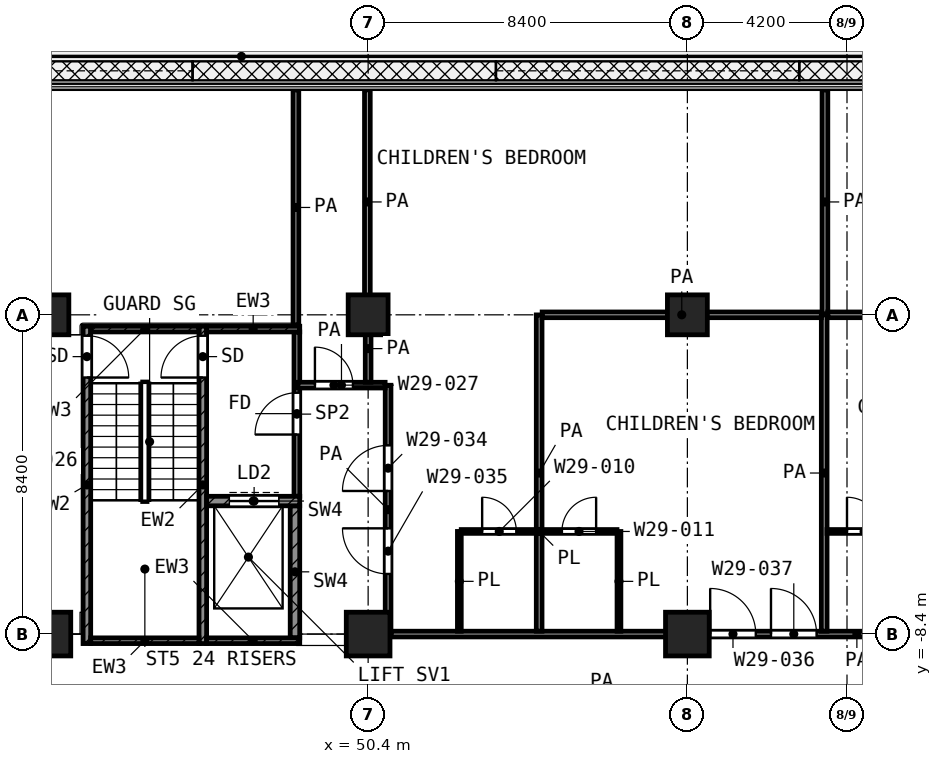
"""IFC4 building model, lengths in metres.
Left out: names, types, materials, properties, quantities, classifications, styles, units other than length and angle.
Written with IfcOpenShell. Run it as: python <this file> out.ifc"""

import sys

from ifc_helpers import new_model, si_unit, direction, frame, frame_2d, origin, origin_2d, place, context, subcontext, project, spatial, rectangle, extrude, element, fill, save


model = new_model("IFC4")
c1 = context("Model", 3, precision=1e-05, world=origin(), true_north=direction((0.0, 1.0)))
c2 = subcontext(c1, "Body", "Model", "MODEL_VIEW")
j1 = project(units=[si_unit("LENGTHUNIT", "METRE"), si_unit("PLANEANGLEUNIT", "RADIAN")], contexts=[c1])
p1 = place(None, origin())
s1 = spatial("IfcSite", under=j1, at=p1, CompositionType="ELEMENT")
p2 = place(p1, origin())
s2 = spatial("IfcBuilding", under=s1, at=p2, CompositionType="ELEMENT")
p3 = place(p2, frame((0.0, 0.0, 128.2)))
s3 = spatial("IfcBuildingStorey", under=s2, at=p3, CompositionType="ELEMENT", Elevation=128.2)
for number, where, z_axis, x_axis in (
    (1, (42.0, 0.0, 0.0), (0.0, 0.0, 1.0), (1.0, 0.0, 0.0)),
    (2, (50.4, 0.0, 0.0), (0.0, 0.0, 1.0), (1.0, 0.0, 0.0)),
    (3, (58.8, 0.0, 0.0), (0.0, 0.0, 1.0), (1.0, 0.0, 0.0)),
):
    element("IfcColumn", number, at=place(p3, frame(where, z_axis=z_axis, x_axis=x_axis)), inside=s3, PredefinedType="COLUMN", context=c2, shape_type="SweptSolid", body=[
        extrude(rectangle(XDim=1.05, YDim=1.05, at=origin_2d()), origin(), (0.0, 0.0, 1.0), 4.2),
    ])
for number, where, z_axis, x_axis in (
    (4, (42.0, -8.4, 0.0), (0.0, 0.0, 1.0), (1.0, 0.0, 0.0)),
    (5, (50.4, -8.4, 0.0), (0.0, 0.0, 1.0), (1.0, 0.0, 0.0)),
    (6, (58.8, -8.4, 0.0), (0.0, 0.0, 1.0), (1.0, 0.0, 0.0)),
):
    element("IfcColumn", number, at=place(p3, frame(where, z_axis=z_axis, x_axis=x_axis)), inside=s3, PredefinedType="COLUMN", context=c2, shape_type="SweptSolid", body=[
        extrude(rectangle(XDim=1.15, YDim=1.15, at=origin_2d()), origin(), (0.0, 0.0, 1.0), 4.2),
    ])
p4 = place(p3, frame((43.0, -8.65, 0.0), z_axis=(0.0, 0.0, 1.0), x_axis=(0.0, 1.0, 0.0)))
e7 = element("IfcWall", 7, at=p4, inside=s3, PredefinedType="SHEAR", context=c2, shape_type="SweptSolid", body=[
    extrude(rectangle(XDim=8.35, YDim=0.2, at=frame_2d((4.175, 0.0))), origin(), (0.0, 0.0, 1.0), 3.6),
])
p5 = place(p4, frame((7.0, 0.0, 0.0)))
e8 = element("IfcOpeningElement", 8, at=p5, cuts=e7, PredefinedType="OPENING", context=c2, shape_type="SweptSolid", body=[
    extrude(rectangle(XDim=1.1, YDim=2.1, at=frame_2d((0.55, 1.05))), frame((0.0, 0.11, 0.0), z_axis=(0.0, -1.0, 0.0), x_axis=(1.0, 0.0, 0.0)), (0.0, 0.0, 1.0), 0.22),
])
p6 = place(p3, frame((46.05, -8.65, 0.0), z_axis=(0.0, 0.0, 1.0), x_axis=(0.0, 1.0, 0.0)))
e9 = element("IfcWall", 9, at=p6, inside=s3, PredefinedType="SHEAR", context=c2, shape_type="SweptSolid", body=[
    extrude(rectangle(XDim=8.35, YDim=0.2, at=frame_2d((4.175, 0.0))), origin(), (0.0, 0.0, 1.0), 3.6),
])
p7 = place(p6, frame((7.0, 0.0, 0.0)))
e10 = element("IfcOpeningElement", 10, at=p7, cuts=e9, PredefinedType="OPENING", context=c2, shape_type="SweptSolid", body=[
    extrude(rectangle(XDim=1.1, YDim=2.1, at=frame_2d((0.55, 1.05))), frame((0.0, 0.11, 0.0), z_axis=(0.0, -1.0, 0.0), x_axis=(1.0, 0.0, 0.0)), (0.0, 0.0, 1.0), 0.22),
])
p8 = place(p3, frame((43.1, -0.375, 0.0), z_axis=(0.0, 0.0, 1.0), x_axis=(1.0, 0.0, 0.0)))
e11 = element("IfcWall", 11, at=p8, inside=s3, PredefinedType="SHEAR", context=c2, shape_type="SweptSolid", body=[
    extrude(rectangle(XDim=2.85, YDim=0.15, at=frame_2d((1.425, 0.0))), origin(), (0.0, 0.0, 1.0), 3.6),
])
p9 = place(p3, frame((46.15, -0.375, 0.0), z_axis=(0.0, 0.0, 1.0), x_axis=(1.0, 0.0, 0.0)))
e12 = element("IfcWall", 12, at=p9, inside=s3, PredefinedType="SHEAR", context=c2, shape_type="SweptSolid", body=[
    extrude(rectangle(XDim=2.45, YDim=0.15, at=frame_2d((1.225, 0.0))), origin(), (0.0, 0.0, 1.0), 3.6),
])
p10 = place(p3, frame((43.1, -8.575, 0.0), z_axis=(0.0, 0.0, 1.0), x_axis=(1.0, 0.0, 0.0)))
e13 = element("IfcWall", 13, at=p10, inside=s3, PredefinedType="SHEAR", context=c2, shape_type="SweptSolid", body=[
    extrude(rectangle(XDim=2.85, YDim=0.15, at=frame_2d((1.425, 0.0))), origin(), (0.0, 0.0, 1.0), 3.6),
])
p11 = place(p3, frame((46.15, -8.575, 0.0), z_axis=(0.0, 0.0, 1.0), x_axis=(1.0, 0.0, 0.0)))
e14 = element("IfcWall", 14, at=p11, inside=s3, PredefinedType="SHEAR", context=c2, shape_type="SweptSolid", body=[
    extrude(rectangle(XDim=2.45, YDim=0.15, at=frame_2d((1.225, 0.0))), origin(), (0.0, 0.0, 1.0), 3.6),
])
p12 = place(p3, frame((46.15, -4.9, 0.0), z_axis=(0.0, 0.0, 1.0), x_axis=(1.0, 0.0, 0.0)))
e15 = element("IfcWall", 15, at=p12, inside=s3, PredefinedType="SHEAR", context=c2, shape_type="SweptSolid", body=[
    extrude(rectangle(XDim=2.45, YDim=0.25, at=frame_2d((1.225, 0.0))), origin(), (0.0, 0.0, 1.0), 3.6),
])
p13 = place(p12, frame((0.6, 0.0, 0.0)))
e16 = element("IfcOpeningElement", 16, at=p13, cuts=e15, PredefinedType="OPENING", context=c2, shape_type="SweptSolid", body=[
    extrude(rectangle(XDim=1.3, YDim=2.1, at=frame_2d((0.65, 1.05))), frame((0.0, 0.135, 0.0), z_axis=(0.0, -1.0, 0.0), x_axis=(1.0, 0.0, 0.0)), (0.0, 0.0, 1.0), 0.27),
])
p14 = place(p3, frame((48.475, -8.5, 0.0), z_axis=(0.0, 0.0, 1.0), x_axis=(0.0, 1.0, 0.0)))
e17 = element("IfcWall", 17, at=p14, inside=s3, PredefinedType="SHEAR", context=c2, shape_type="SweptSolid", body=[
    extrude(rectangle(XDim=3.475, YDim=0.25, at=frame_2d((1.738, 0.0))), origin(), (0.0, 0.0, 1.0), 3.6),
])
p15 = place(p3, frame((48.525, -4.775, 0.0), z_axis=(0.0, 0.0, 1.0), x_axis=(0.0, 1.0, 0.0)))
e18 = element("IfcWall", 18, at=p15, inside=s3, PredefinedType="PARTITIONING", context=c2, shape_type="SweptSolid", body=[
    extrude(rectangle(XDim=4.325, YDim=0.15, at=frame_2d((2.163, 0.0))), origin(), (0.0, 0.0, 1.0), 3.6),
])
p16 = place(p15, frame((1.625, 0.0, 0.0)))
e19 = element("IfcOpeningElement", 19, at=p16, cuts=e18, PredefinedType="OPENING", context=c2, shape_type="SweptSolid", body=[
    extrude(rectangle(XDim=1.1, YDim=2.1, at=frame_2d((0.55, 1.05))), frame((0.0, 0.085, 0.0), z_axis=(0.0, -1.0, 0.0), x_axis=(1.0, 0.0, 0.0)), (0.0, 0.0, 1.0), 0.17),
])
p17 = place(p3, frame((52.85, -5.7, 0.0), z_axis=(0.0, 0.0, 1.0), x_axis=(1.0, 0.0, 0.0)))
e20 = element("IfcWall", 20, at=p17, inside=s3, PredefinedType="PARTITIONING", context=c2, shape_type="SweptSolid", body=[
    extrude(rectangle(XDim=4.098, YDim=0.1, at=frame_2d((2.049, 0.0))), origin(), (0.0, 0.0, 1.0), 3.6),
])
p18 = place(p17, frame((0.55, 0.0, 0.0)))
e21 = element("IfcOpeningElement", 21, at=p18, cuts=e20, PredefinedType="OPENING", context=c2, shape_type="SweptSolid", body=[
    extrude(rectangle(XDim=0.9, YDim=2.1, at=frame_2d((0.45, 1.05))), frame((0.0, 0.06, 0.0), z_axis=(0.0, -1.0, 0.0), x_axis=(1.0, 0.0, 0.0)), (0.0, 0.0, 1.0), 0.12),
])
p19 = place(p17, frame((2.649, 0.0, 0.0)))
e22 = element("IfcOpeningElement", 22, at=p19, cuts=e20, PredefinedType="OPENING", context=c2, shape_type="SweptSolid", body=[
    extrude(rectangle(XDim=0.9, YDim=2.1, at=frame_2d((0.45, 1.05))), frame((0.0, 0.06, 0.0), z_axis=(0.0, -1.0, 0.0), x_axis=(1.0, 0.0, 0.0)), (0.0, 0.0, 1.0), 0.12),
])
p20 = place(p3, frame((62.475, -5.7, 0.0), z_axis=(0.0, 0.0, 1.0), x_axis=(1.0, 0.0, 0.0)))
e23 = element("IfcWall", 23, at=p20, inside=s3, PredefinedType="PARTITIONING", context=c2, shape_type="SweptSolid", body=[
    extrude(rectangle(XDim=1.975, YDim=0.1, at=frame_2d((0.987, 0.0))), origin(), (0.0, 0.0, 1.0), 3.6),
])
p21 = place(p20, frame((0.525, 0.0, 0.0)))
e24 = element("IfcOpeningElement", 24, at=p21, cuts=e23, PredefinedType="OPENING", context=c2, shape_type="SweptSolid", body=[
    extrude(rectangle(XDim=0.9, YDim=2.1, at=frame_2d((0.45, 1.05))), frame((0.0, 0.06, 0.0), z_axis=(0.0, -1.0, 0.0), x_axis=(1.0, 0.0, 0.0)), (0.0, 0.0, 1.0), 0.12),
])
p22 = place(p3, frame((52.8, -8.325, 0.0), z_axis=(0.0, 0.0, 1.0), x_axis=(0.0, 1.0, 0.0)))
e25 = element("IfcWall", 25, at=p22, inside=s3, PredefinedType="PARTITIONING", context=c2, shape_type="SweptSolid", body=[
    extrude(rectangle(XDim=2.625, YDim=0.1, at=frame_2d((1.312, 0.0))), origin(), (0.0, 0.0, 1.0), 3.6),
])
p23 = place(p3, frame((57.0, -8.325, 0.0), z_axis=(0.0, 0.0, 1.0), x_axis=(0.0, 1.0, 0.0)))
e26 = element("IfcWall", 26, at=p23, inside=s3, PredefinedType="PARTITIONING", context=c2, shape_type="SweptSolid", body=[
    extrude(rectangle(XDim=2.624, YDim=0.1, at=frame_2d((1.312, 0.0))), origin(), (0.0, 0.0, 1.0), 3.6),
])
p24 = place(p3, frame((51.0, -8.4, 0.0), z_axis=(0.0, 0.0, 1.0), x_axis=(1.0, 0.0, 0.0)))
e27 = element("IfcWall", 27, at=p24, inside=s3, PredefinedType="PARTITIONING", context=c2, shape_type="SweptSolid", body=[
    extrude(rectangle(XDim=24.52, YDim=0.15, at=frame_2d((12.26, 0.0))), origin(), (0.0, 0.0, 1.0), 3.6),
])
p25 = place(p24, frame((8.4, 0.0, 0.0)))
e28 = element("IfcOpeningElement", 28, at=p25, cuts=e27, PredefinedType="OPENING", context=c2, shape_type="SweptSolid", body=[
    extrude(rectangle(XDim=1.2, YDim=2.1, at=frame_2d((0.6, 1.05))), frame((0.0, 0.085, 0.0), z_axis=(0.0, -1.0, 0.0), x_axis=(1.0, 0.0, 0.0)), (0.0, 0.0, 1.0), 0.17),
])
p26 = place(p24, frame((10.0, 0.0, 0.0)))
e29 = element("IfcOpeningElement", 29, at=p26, cuts=e27, PredefinedType="OPENING", context=c2, shape_type="SweptSolid", body=[
    extrude(rectangle(XDim=1.2, YDim=2.1, at=frame_2d((0.6, 1.05))), frame((0.0, 0.085, 0.0), z_axis=(0.0, -1.0, 0.0), x_axis=(1.0, 0.0, 0.0)), (0.0, 0.0, 1.0), 0.17),
])
p27 = place(p24, frame((13.8, 0.0, 0.0)))
e30 = element("IfcOpeningElement", 30, at=p27, cuts=e27, PredefinedType="OPENING", context=c2, shape_type="SweptSolid", body=[
    extrude(rectangle(XDim=1.2, YDim=2.1, at=frame_2d((0.6, 1.05))), frame((0.0, 0.085, 0.0), z_axis=(0.0, -1.0, 0.0), x_axis=(1.0, 0.0, 0.0)), (0.0, 0.0, 1.0), 0.17),
])
p28 = place(p24, frame((16.8, 0.0, 0.0)))
e31 = element("IfcOpeningElement", 31, at=p28, cuts=e27, PredefinedType="OPENING", context=c2, shape_type="SweptSolid", body=[
    extrude(rectangle(XDim=1.2, YDim=2.1, at=frame_2d((0.6, 1.05))), frame((0.0, 0.085, 0.0), z_axis=(0.0, -1.0, 0.0), x_axis=(1.0, 0.0, 0.0)), (0.0, 0.0, 1.0), 0.17),
])
p29 = place(p24, frame((22.0, 0.0, 0.0)))
e32 = element("IfcOpeningElement", 32, at=p29, cuts=e27, PredefinedType="OPENING", context=c2, shape_type="SweptSolid", body=[
    extrude(rectangle(XDim=1.0, YDim=2.1, at=frame_2d((0.5, 1.05))), frame((0.0, 0.085, 0.0), z_axis=(0.0, -1.0, 0.0), x_axis=(1.0, 0.0, 0.0)), (0.0, 0.0, 1.0), 0.17),
])
p30 = place(p3, frame((48.55, -1.85, 0.0), z_axis=(0.0, 0.0, 1.0), x_axis=(1.0, 0.0, 0.0)))
e33 = element("IfcWall", 33, at=p30, inside=s3, PredefinedType="PARTITIONING", context=c2, shape_type="SweptSolid", body=[
    extrude(rectangle(XDim=2.297, YDim=0.15, at=frame_2d((1.148, 0.0))), origin(), (0.0, 0.0, 1.0), 3.6),
])
p31 = place(p30, frame((0.45, 0.0, 0.0)))
e34 = element("IfcOpeningElement", 34, at=p31, cuts=e33, PredefinedType="OPENING", context=c2, shape_type="SweptSolid", body=[
    extrude(rectangle(XDim=1.0, YDim=2.1, at=frame_2d((0.5, 1.05))), frame((0.0, 0.085, 0.0), z_axis=(0.0, -1.0, 0.0), x_axis=(1.0, 0.0, 0.0)), (0.0, 0.0, 1.0), 0.17),
])
p32 = place(p3, frame((54.979, 0.0, 0.0), z_axis=(0.0, 0.0, 1.0), x_axis=(1.0, 0.0, 0.0)))
e35 = element("IfcWall", 35, at=p32, inside=s3, PredefinedType="PARTITIONING", context=c2, shape_type="SweptSolid", body=[
    extrude(rectangle(XDim=7.346, YDim=0.15, at=frame_2d((3.673, 0.0))), origin(), (0.0, 0.0, 1.0), 3.6),
])
p33 = place(p3, frame((62.495, 0.0, 0.0), z_axis=(0.0, 0.0, 1.0), x_axis=(1.0, 0.0, 0.0)))
e36 = element("IfcWall", 36, at=p33, inside=s3, PredefinedType="PARTITIONING", context=c2, shape_type="SweptSolid", body=[
    extrude(rectangle(XDim=4.61, YDim=0.15, at=frame_2d((2.305, 0.0))), origin(), (0.0, 0.0, 1.0), 3.6),
])
p34 = place(p3, frame((48.5, -0.27, 0.0), z_axis=(0.0, 0.0, 1.0), x_axis=(0.0, 1.0, 0.0)))
e37 = element("IfcWall", 37, at=p34, inside=s3, PredefinedType="PARTITIONING", context=c2, shape_type="SweptSolid", body=[
    extrude(rectangle(XDim=6.19, YDim=0.15, at=frame_2d((3.095, 0.0))), origin(), (0.0, 0.0, 1.0), 3.6),
])
p35 = place(p3, frame((50.38, 0.02, 0.0), z_axis=(0.0, 0.0, 1.0), x_axis=(0.0, 1.0, 0.0)))
e38 = element("IfcWall", 38, at=p35, inside=s3, PredefinedType="PARTITIONING", context=c2, shape_type="SweptSolid", body=[
    extrude(rectangle(XDim=5.9, YDim=0.15, at=frame_2d((2.95, 0.0))), origin(), (0.0, 0.0, 1.0), 3.6),
])
p36 = place(p3, frame((50.4, -1.775, 0.0), z_axis=(0.0, 0.0, 1.0), x_axis=(0.0, 1.0, 0.0)))
e39 = element("IfcWall", 39, at=p36, inside=s3, PredefinedType="PARTITIONING", context=c2, shape_type="SweptSolid", body=[
    extrude(rectangle(XDim=1.772, YDim=0.15, at=frame_2d((0.886, 0.0))), origin(), (0.0, 0.0, 1.0), 3.6),
])
p37 = place(p3, frame((50.925, -8.4, 0.0), z_axis=(0.0, 0.0, 1.0), x_axis=(0.0, 1.0, 0.0)))
e40 = element("IfcWall", 40, at=p37, inside=s3, PredefinedType="PARTITIONING", context=c2, shape_type="SweptSolid", body=[
    extrude(rectangle(XDim=6.547, YDim=0.15, at=frame_2d((3.273, 0.0))), origin(), (0.0, 0.0, 1.0), 3.6),
])
p38 = place(p37, frame((3.765, 0.0, 0.0)))
e41 = element("IfcOpeningElement", 41, at=p38, cuts=e40, PredefinedType="OPENING", context=c2, shape_type="SweptSolid", body=[
    extrude(rectangle(XDim=1.2, YDim=2.1, at=frame_2d((0.6, 1.05))), frame((0.0, 0.085, 0.0), z_axis=(0.0, -1.0, 0.0), x_axis=(1.0, 0.0, 0.0)), (0.0, 0.0, 1.0), 0.17),
])
p39 = place(p37, frame((1.582, 0.0, 0.0)))
e42 = element("IfcOpeningElement", 42, at=p39, cuts=e40, PredefinedType="OPENING", context=c2, shape_type="SweptSolid", body=[
    extrude(rectangle(XDim=1.2, YDim=2.1, at=frame_2d((0.6, 1.05))), frame((0.0, 0.085, 0.0), z_axis=(0.0, -1.0, 0.0), x_axis=(1.0, 0.0, 0.0)), (0.0, 0.0, 1.0), 0.17),
])
p40 = place(p3, frame((54.9, -8.325, 0.0), z_axis=(0.0, 0.0, 1.0), x_axis=(0.0, 1.0, 0.0)))
e43 = element("IfcWall", 43, at=p40, inside=s3, PredefinedType="PARTITIONING", context=c2, shape_type="SweptSolid", body=[
    extrude(rectangle(XDim=8.323, YDim=0.15, at=frame_2d((4.162, 0.0))), origin(), (0.0, 0.0, 1.0), 3.6),
])
p41 = place(p3, frame((62.4, -8.325, 0.0), z_axis=(0.0, 0.0, 1.0), x_axis=(0.0, 1.0, 0.0)))
e44 = element("IfcWall", 44, at=p41, inside=s3, PredefinedType="PARTITIONING", context=c2, shape_type="SweptSolid", body=[
    extrude(rectangle(XDim=8.325, YDim=0.15, at=frame_2d((4.163, 0.0))), origin(), (0.0, 0.0, 1.0), 3.6),
])
p42 = place(p3, frame((62.42, 0.02, 0.0), z_axis=(0.0, 0.0, 1.0), x_axis=(0.0, 1.0, 0.0)))
e45 = element("IfcWall", 45, at=p42, inside=s3, PredefinedType="PARTITIONING", context=c2, shape_type="SweptSolid", body=[
    extrude(rectangle(XDim=5.9, YDim=0.15, at=frame_2d((2.95, 0.0))), origin(), (0.0, 0.0, 1.0), 3.6),
])
p43 = place(p5, frame((1.1, 0.0, 0.0), z_axis=(0.0, 0.0, 1.0), x_axis=(-1.0, 0.0, 0.0)))
e46 = element("IfcDoor", 46, at=p43, inside=s3, OperationType="SINGLE_SWING_LEFT", PredefinedType="DOOR", context=c2, shape_type="SweptSolid", body=[
    extrude(rectangle(XDim=1.1, YDim=2.1, at=frame_2d((0.55, 1.05))), frame((0.0, 0.025, 0.0), z_axis=(0.0, -1.0, 0.0), x_axis=(1.0, 0.0, 0.0)), (0.0, 0.0, 1.0), 0.05),
])
fill(e8, e46)
p44 = place(p7, origin())
e47 = element("IfcDoor", 47, at=p44, inside=s3, OperationType="SINGLE_SWING_LEFT", PredefinedType="DOOR", context=c2, shape_type="SweptSolid", body=[
    extrude(rectangle(XDim=1.1, YDim=2.1, at=frame_2d((0.55, 1.05))), frame((0.0, 0.025, 0.0), z_axis=(0.0, -1.0, 0.0), x_axis=(1.0, 0.0, 0.0)), (0.0, 0.0, 1.0), 0.05),
])
fill(e10, e47)
p45 = place(p13, origin())
e48 = element("IfcDoor", 48, at=p45, inside=s3, OperationType="DOUBLE_DOOR_SLIDING", PredefinedType="DOOR", context=c2, shape_type="SweptSolid", body=[
    extrude(rectangle(XDim=1.3, YDim=2.1, at=frame_2d((0.65, 1.05))), frame((0.0, 0.025, 0.0), z_axis=(0.0, -1.0, 0.0), x_axis=(1.0, 0.0, 0.0)), (0.0, 0.0, 1.0), 0.05),
])
fill(e16, e48)
p46 = place(p16, origin())
e49 = element("IfcDoor", 49, at=p46, inside=s3, OperationType="SINGLE_SWING_LEFT", PredefinedType="DOOR", context=c2, shape_type="SweptSolid", body=[
    extrude(rectangle(XDim=1.1, YDim=2.1, at=frame_2d((0.55, 1.05))), frame((0.0, 0.025, 0.0), z_axis=(0.0, -1.0, 0.0), x_axis=(1.0, 0.0, 0.0)), (0.0, 0.0, 1.0), 0.05),
])
fill(e19, e49)
p47 = place(p31, origin())
e50 = element("IfcDoor", 50, at=p47, inside=s3, OperationType="SINGLE_SWING_LEFT", PredefinedType="DOOR", context=c2, shape_type="SweptSolid", body=[
    extrude(rectangle(XDim=1.0, YDim=2.1, at=frame_2d((0.5, 1.05))), frame((0.0, 0.025, 0.0), z_axis=(0.0, -1.0, 0.0), x_axis=(1.0, 0.0, 0.0)), (0.0, 0.0, 1.0), 0.05),
])
fill(e34, e50)
p48 = place(p38, origin())
e51 = element("IfcDoor", 51, at=p48, inside=s3, OperationType="SINGLE_SWING_LEFT", PredefinedType="DOOR", context=c2, shape_type="SweptSolid", body=[
    extrude(rectangle(XDim=1.2, YDim=2.1, at=frame_2d((0.6, 1.05))), frame((0.0, 0.025, 0.0), z_axis=(0.0, -1.0, 0.0), x_axis=(1.0, 0.0, 0.0)), (0.0, 0.0, 1.0), 0.05),
])
fill(e41, e51)
p49 = place(p39, origin())
e52 = element("IfcDoor", 52, at=p49, inside=s3, OperationType="SINGLE_SWING_RIGHT", PredefinedType="DOOR", context=c2, shape_type="SweptSolid", body=[
    extrude(rectangle(XDim=1.2, YDim=2.1, at=frame_2d((0.6, 1.05))), frame((0.0, 0.025, 0.0), z_axis=(0.0, -1.0, 0.0), x_axis=(1.0, 0.0, 0.0)), (0.0, 0.0, 1.0), 0.05),
])
fill(e42, e52)
p50 = place(p18, origin())
e53 = element("IfcDoor", 53, at=p50, inside=s3, OperationType="SINGLE_SWING_LEFT", PredefinedType="DOOR", context=c2, shape_type="SweptSolid", body=[
    extrude(rectangle(XDim=0.9, YDim=2.1, at=frame_2d((0.45, 1.05))), frame((0.0, 0.025, 0.0), z_axis=(0.0, -1.0, 0.0), x_axis=(1.0, 0.0, 0.0)), (0.0, 0.0, 1.0), 0.05),
])
fill(e21, e53)
p51 = place(p25, origin())
e54 = element("IfcDoor", 54, at=p51, inside=s3, OperationType="SINGLE_SWING_LEFT", PredefinedType="DOOR", context=c2, shape_type="SweptSolid", body=[
    extrude(rectangle(XDim=1.2, YDim=2.1, at=frame_2d((0.6, 1.05))), frame((0.0, 0.025, 0.0), z_axis=(0.0, -1.0, 0.0), x_axis=(1.0, 0.0, 0.0)), (0.0, 0.0, 1.0), 0.05),
])
fill(e28, e54)
p52 = place(p26, origin())
e55 = element("IfcDoor", 55, at=p52, inside=s3, OperationType="SINGLE_SWING_LEFT", PredefinedType="DOOR", context=c2, shape_type="SweptSolid", body=[
    extrude(rectangle(XDim=1.2, YDim=2.1, at=frame_2d((0.6, 1.05))), frame((0.0, 0.025, 0.0), z_axis=(0.0, -1.0, 0.0), x_axis=(1.0, 0.0, 0.0)), (0.0, 0.0, 1.0), 0.05),
])
fill(e29, e55)
p53 = place(p19, origin())
e56 = element("IfcDoor", 56, at=p53, inside=s3, OperationType="SINGLE_SWING_RIGHT", PredefinedType="DOOR", context=c2, shape_type="SweptSolid", body=[
    extrude(rectangle(XDim=0.9, YDim=2.1, at=frame_2d((0.45, 1.05))), frame((0.0, 0.025, 0.0), z_axis=(0.0, -1.0, 0.0), x_axis=(1.0, 0.0, 0.0)), (0.0, 0.0, 1.0), 0.05),
])
fill(e22, e56)
p54 = place(p21, origin())
e57 = element("IfcDoor", 57, at=p54, inside=s3, OperationType="SINGLE_SWING_LEFT", PredefinedType="DOOR", context=c2, shape_type="SweptSolid", body=[
    extrude(rectangle(XDim=0.9, YDim=2.1, at=frame_2d((0.45, 1.05))), frame((0.0, 0.025, 0.0), z_axis=(0.0, -1.0, 0.0), x_axis=(1.0, 0.0, 0.0)), (0.0, 0.0, 1.0), 0.05),
])
fill(e24, e57)
save(model, sys.argv[1])
